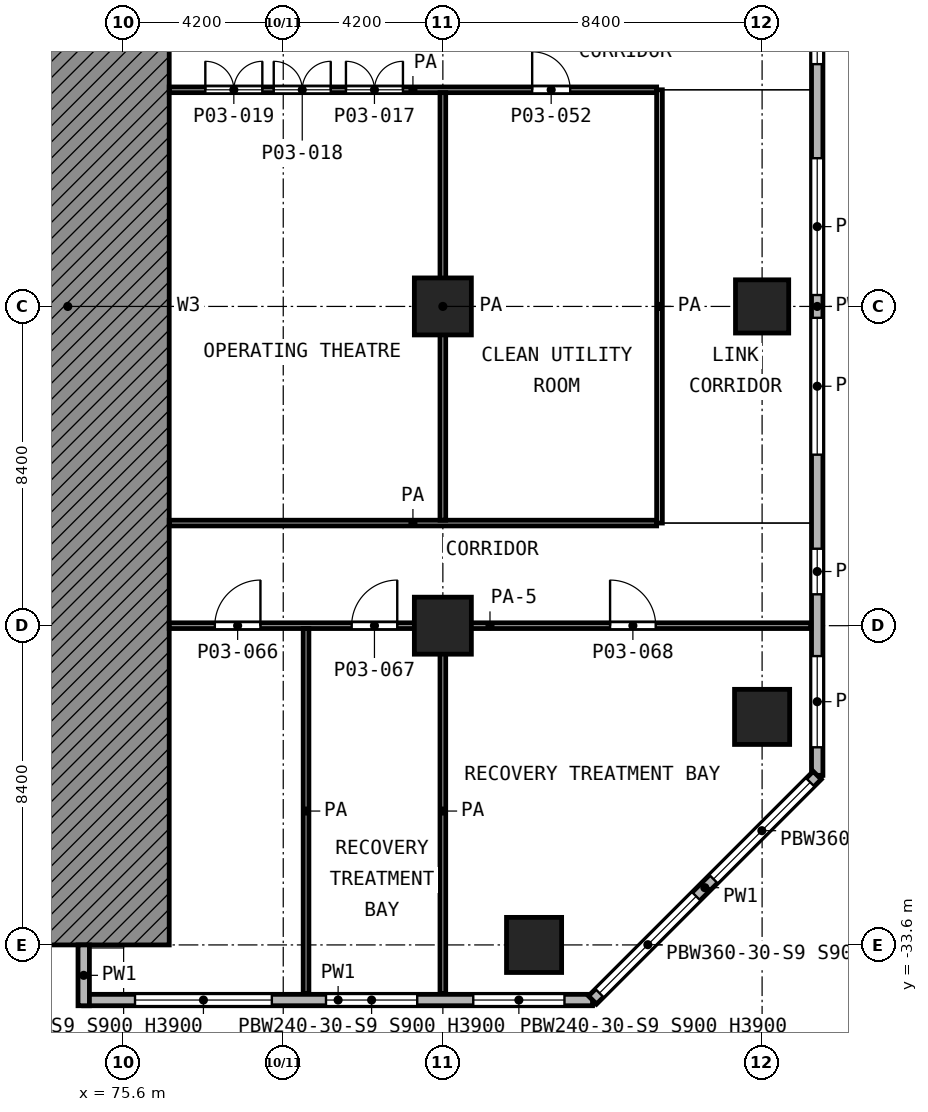
"""IFC4 building model, lengths in metres.
Left out: names, types, materials, properties, quantities, classifications, styles, units other than length and angle.
Written with IfcOpenShell. Run it as: python <this file> out.ifc"""

import sys

from ifc_helpers import new_model, si_unit, direction, frame, frame_2d, origin, origin_2d, place, context, subcontext, project, spatial, polyline, rectangle, outline, extrude, element, fill, save


model = new_model("IFC4")
c1 = context("Model", 3, precision=1e-05, world=origin(), true_north=direction((0.0, 1.0)))
c2 = subcontext(c1, "Body", "Model", "MODEL_VIEW")
j1 = project(units=[si_unit("LENGTHUNIT", "METRE"), si_unit("PLANEANGLEUNIT", "RADIAN")], contexts=[c1])
p1 = place(None, origin())
s1 = spatial("IfcSite", under=j1, at=p1, CompositionType="ELEMENT")
p2 = place(p1, origin())
s2 = spatial("IfcBuilding", under=s1, at=p2, CompositionType="ELEMENT")
p3 = place(p2, frame((0.0, 0.0, 12.6)))
s3 = spatial("IfcBuildingStorey", under=s2, at=p3, CompositionType="ELEMENT", Elevation=12.6)
p4 = place(p3, frame((84.0, -16.8, 0.0), z_axis=(0.0, 0.0, 1.0), x_axis=(1.0, 0.0, 0.0)))
e1 = element("IfcColumn", 1, at=p4, inside=s3, PredefinedType="COLUMN", context=c2, shape_type="SweptSolid", body=[
    extrude(rectangle(XDim=1.5, YDim=1.5, at=origin_2d()), origin(), (0.0, 0.0, 1.0), 5.6),
])
p5 = place(p3, frame((92.4, -16.8, 0.0), z_axis=(0.0, 0.0, 1.0), x_axis=(1.0, 0.0, 0.0)))
e2 = element("IfcColumn", 2, at=p5, inside=s3, PredefinedType="COLUMN", context=c2, shape_type="SweptSolid", body=[
    extrude(rectangle(XDim=1.4, YDim=1.4, at=origin_2d()), origin(), (0.0, 0.0, 1.0), 5.6),
])
p6 = place(p3, frame((84.0, -25.2, 0.0), z_axis=(0.0, 0.0, 1.0), x_axis=(1.0, 0.0, 0.0)))
e3 = element("IfcColumn", 3, at=p6, inside=s3, PredefinedType="COLUMN", context=c2, shape_type="SweptSolid", body=[
    extrude(rectangle(XDim=1.5, YDim=1.5, at=origin_2d()), origin(), (0.0, 0.0, 1.0), 5.6),
])
for number, where, z_axis, x_axis in (
    (4, (92.4, -27.6, 0.0), (0.0, 0.0, 1.0), (1.0, 0.0, 0.0)),
    (5, (86.4, -33.6, 0.0), (0.0, 0.0, 1.0), (1.0, 0.0, 0.0)),
):
    element("IfcColumn", number, at=place(p3, frame(where, z_axis=z_axis, x_axis=x_axis)), inside=s3, PredefinedType="COLUMN", context=c2, shape_type="SweptSolid", body=[
        extrude(rectangle(XDim=1.45, YDim=1.45, at=origin_2d()), origin(), (0.0, 0.0, 1.0), 5.6),
    ])
p7 = place(p3, frame((0.0, 0.0, -12.6), z_axis=(0.0, -1.0, 0.0), x_axis=(1.0, 0.0, 0.0)))
e6 = element("IfcWall", 6, at=p7, inside=s3, PredefinedType="SHEAR", context=c2, shape_type="SweptSolid", body=[
    extrude(outline(polyline([(73.952, 12.6), (73.766, 13.468), (72.986, 15.591), (71.916, 17.583), (71.462, 18.2), (76.8, 18.2), (76.8, 12.6), (73.952, 12.6)])), origin(), (0.0, 0.0, 1.0), 33.6),
])
p8 = place(p3, frame((93.85, -29.138, 0.0), z_axis=(0.0, 0.0, 1.0), x_axis=(0.0, 1.0, 0.0)))
e7 = element("IfcWall", 7, at=p8, inside=s3, PredefinedType="SOLIDWALL", context=c2, shape_type="SweptSolid", body=[
    extrude(rectangle(XDim=24.676, YDim=0.3, at=frame_2d((12.338, 0.0))), origin(), (0.0, 0.0, 1.0), 5.25),
])
p9 = place(p8, frame((0.738, 0.0, 0.9)))
e8 = element("IfcOpeningElement", 8, at=p9, cuts=e7, PredefinedType="OPENING", context=c2, shape_type="SweptSolid", body=[
    extrude(rectangle(XDim=2.4, YDim=3.0, at=frame_2d((1.2, 1.5))), frame((0.0, 0.16, 0.0), z_axis=(0.0, -1.0, 0.0), x_axis=(1.0, 0.0, 0.0)), (0.0, 0.0, 1.0), 0.32),
])
p10 = place(p8, frame((4.763, 0.0, 0.9)))
e9 = element("IfcOpeningElement", 9, at=p10, cuts=e7, PredefinedType="OPENING", context=c2, shape_type="SweptSolid", body=[
    extrude(rectangle(XDim=1.2, YDim=3.0, at=frame_2d((0.6, 1.5))), frame((0.0, 0.16, 0.0), z_axis=(0.0, -1.0, 0.0), x_axis=(1.0, 0.0, 0.0)), (0.0, 0.0, 1.0), 0.32),
])
p11 = place(p8, frame((8.438, 0.0, 0.9)))
e10 = element("IfcOpeningElement", 10, at=p11, cuts=e7, PredefinedType="OPENING", context=c2, shape_type="SweptSolid", body=[
    extrude(rectangle(XDim=3.6, YDim=3.0, at=frame_2d((1.8, 1.5))), frame((0.0, 0.16, 0.0), z_axis=(0.0, -1.0, 0.0), x_axis=(1.0, 0.0, 0.0)), (0.0, 0.0, 1.0), 0.32),
])
p12 = place(p8, frame((12.638, 0.0, 0.9)))
e11 = element("IfcOpeningElement", 11, at=p12, cuts=e7, PredefinedType="OPENING", context=c2, shape_type="SweptSolid", body=[
    extrude(rectangle(XDim=3.6, YDim=3.0, at=frame_2d((1.8, 1.5))), frame((0.0, 0.16, 0.0), z_axis=(0.0, -1.0, 0.0), x_axis=(1.0, 0.0, 0.0)), (0.0, 0.0, 1.0), 0.32),
])
p13 = place(p8, frame((18.713, 0.0, 0.9)))
e12 = element("IfcOpeningElement", 12, at=p13, cuts=e7, PredefinedType="OPENING", context=c2, shape_type="SweptSolid", body=[
    extrude(rectangle(XDim=1.2, YDim=3.0, at=frame_2d((0.6, 1.5))), frame((0.0, 0.16, 0.0), z_axis=(0.0, -1.0, 0.0), x_axis=(1.0, 0.0, 0.0)), (0.0, 0.0, 1.0), 0.32),
])
p14 = place(p8, frame((21.538, 0.0, 0.9)))
e13 = element("IfcOpeningElement", 13, at=p14, cuts=e7, PredefinedType="OPENING", context=c2, shape_type="SweptSolid", body=[
    extrude(rectangle(XDim=2.4, YDim=3.0, at=frame_2d((1.2, 1.5))), frame((0.0, 0.16, 0.0), z_axis=(0.0, -1.0, 0.0), x_axis=(1.0, 0.0, 0.0)), (0.0, 0.0, 1.0), 0.32),
])
p15 = place(p3, frame((74.55, -33.6, 0.0), z_axis=(0.0, 0.0, 1.0), x_axis=(0.0, -1.0, 0.0)))
e14 = element("IfcWall", 14, at=p15, inside=s3, PredefinedType="SOLIDWALL", context=c2, shape_type="SweptSolid", body=[
    extrude(rectangle(XDim=1.6, YDim=0.3, at=frame_2d((0.8, 0.0))), origin(), (0.0, 0.0, 1.0), 5.25),
])
p16 = place(p3, frame((74.55, -35.05, 0.0), z_axis=(0.0, 0.0, 1.0), x_axis=(1.0, 0.0, 0.0)))
e15 = element("IfcWall", 15, at=p16, inside=s3, PredefinedType="SOLIDWALL", context=c2, shape_type="SweptSolid", body=[
    extrude(rectangle(XDim=13.388, YDim=0.3, at=frame_2d((6.694, 0.0))), origin(), (0.0, 0.0, 1.0), 5.25),
])
p17 = place(p16, frame((1.35, 0.0, 0.9)))
e16 = element("IfcOpeningElement", 16, at=p17, cuts=e15, PredefinedType="OPENING", context=c2, shape_type="SweptSolid", body=[
    extrude(rectangle(XDim=3.6, YDim=3.0, at=frame_2d((1.8, 1.5))), frame((0.0, 0.16, 0.0), z_axis=(0.0, -1.0, 0.0), x_axis=(1.0, 0.0, 0.0)), (0.0, 0.0, 1.0), 0.32),
])
p18 = place(p16, frame((6.375, 0.0, 0.9)))
e17 = element("IfcOpeningElement", 17, at=p18, cuts=e15, PredefinedType="OPENING", context=c2, shape_type="SweptSolid", body=[
    extrude(rectangle(XDim=2.4, YDim=3.0, at=frame_2d((1.2, 1.5))), frame((0.0, 0.16, 0.0), z_axis=(0.0, -1.0, 0.0), x_axis=(1.0, 0.0, 0.0)), (0.0, 0.0, 1.0), 0.32),
])
p19 = place(p16, frame((10.25, 0.0, 0.9)))
e18 = element("IfcOpeningElement", 18, at=p19, cuts=e15, PredefinedType="OPENING", context=c2, shape_type="SweptSolid", body=[
    extrude(rectangle(XDim=2.4, YDim=3.0, at=frame_2d((1.2, 1.5))), frame((0.0, 0.16, 0.0), z_axis=(0.0, -1.0, 0.0), x_axis=(1.0, 0.0, 0.0)), (0.0, 0.0, 1.0), 0.32),
])
p20 = place(p3, frame((87.938, -35.05, 0.0), z_axis=(0.0, 0.0, 1.0), x_axis=(0.707106781187, 0.707106781187, 0.0)))
e19 = element("IfcWall", 19, at=p20, inside=s3, PredefinedType="SOLIDWALL", context=c2, shape_type="SweptSolid", body=[
    extrude(rectangle(XDim=8.361, YDim=0.3, at=frame_2d((4.181, 0.0))), origin(), (0.0, 0.0, 1.0), 5.25),
])
p21 = place(p20, frame((0.259, 0.0, 0.9)))
e20 = element("IfcOpeningElement", 20, at=p21, cuts=e19, PredefinedType="OPENING", context=c2, shape_type="SweptSolid", body=[
    extrude(rectangle(XDim=3.6, YDim=3.0, at=frame_2d((1.8, 1.5))), frame((0.0, 0.16, 0.0), z_axis=(0.0, -1.0, 0.0), x_axis=(1.0, 0.0, 0.0)), (0.0, 0.0, 1.0), 0.32),
])
p22 = place(p20, frame((4.502, 0.0, 0.9)))
e21 = element("IfcOpeningElement", 21, at=p22, cuts=e19, PredefinedType="OPENING", context=c2, shape_type="SweptSolid", body=[
    extrude(rectangle(XDim=3.6, YDim=3.0, at=frame_2d((1.8, 1.5))), frame((0.0, 0.16, 0.0), z_axis=(0.0, -1.0, 0.0), x_axis=(1.0, 0.0, 0.0)), (0.0, 0.0, 1.0), 0.32),
])
p23 = place(p3, frame((76.8, -25.2, 0.0), z_axis=(0.0, 0.0, 1.0), x_axis=(1.0, 0.0, 0.0)))
e22 = element("IfcWall", 22, at=p23, inside=s3, PredefinedType="PARTITIONING", context=c2, shape_type="SweptSolid", body=[
    extrude(rectangle(XDim=16.88, YDim=0.15, at=frame_2d((8.44, 0.0))), origin(), (0.0, 0.0, 1.0), 3.85),
])
p24 = place(p23, frame((1.2, 0.0, 0.0)))
e23 = element("IfcOpeningElement", 23, at=p24, cuts=e22, PredefinedType="OPENING", context=c2, shape_type="SweptSolid", body=[
    extrude(rectangle(XDim=1.2, YDim=2.1, at=frame_2d((0.6, 1.05))), frame((0.0, 0.085, 0.0), z_axis=(0.0, -1.0, 0.0), x_axis=(1.0, 0.0, 0.0)), (0.0, 0.0, 1.0), 0.17),
])
p25 = place(p23, frame((4.8, 0.0, 0.0)))
e24 = element("IfcOpeningElement", 24, at=p25, cuts=e22, PredefinedType="OPENING", context=c2, shape_type="SweptSolid", body=[
    extrude(rectangle(XDim=1.2, YDim=2.1, at=frame_2d((0.6, 1.05))), frame((0.0, 0.085, 0.0), z_axis=(0.0, -1.0, 0.0), x_axis=(1.0, 0.0, 0.0)), (0.0, 0.0, 1.0), 0.17),
])
p26 = place(p23, frame((11.6, 0.0, 0.0)))
e25 = element("IfcOpeningElement", 25, at=p26, cuts=e22, PredefinedType="OPENING", context=c2, shape_type="SweptSolid", body=[
    extrude(rectangle(XDim=1.2, YDim=2.1, at=frame_2d((0.6, 1.05))), frame((0.0, 0.085, 0.0), z_axis=(0.0, -1.0, 0.0), x_axis=(1.0, 0.0, 0.0)), (0.0, 0.0, 1.0), 0.17),
])
p27 = place(p3, frame((76.8, -22.5, 0.0), z_axis=(0.0, 0.0, 1.0), x_axis=(1.0, 0.0, 0.0)))
e26 = element("IfcWall", 26, at=p27, inside=s3, PredefinedType="PARTITIONING", context=c2, shape_type="SweptSolid", body=[
    extrude(rectangle(XDim=12.825, YDim=0.15, at=frame_2d((6.413, 0.0))), origin(), (0.0, 0.0, 1.0), 5.25),
])
p28 = place(p3, frame((76.8, -11.1, 0.0), z_axis=(0.0, 0.0, 1.0), x_axis=(1.0, 0.0, 0.0)))
e27 = element("IfcWall", 27, at=p28, inside=s3, PredefinedType="PARTITIONING", context=c2, shape_type="SweptSolid", body=[
    extrude(rectangle(XDim=12.825, YDim=0.15, at=frame_2d((6.413, 0.0))), origin(), (0.0, 0.0, 1.0), 5.25),
])
p29 = place(p28, frame((4.65, 0.0, 0.0)))
e28 = element("IfcOpeningElement", 28, at=p29, cuts=e27, PredefinedType="OPENING", context=c2, shape_type="SweptSolid", body=[
    extrude(rectangle(XDim=1.5, YDim=2.1, at=frame_2d((0.75, 1.05))), frame((0.0, 0.085, 0.0), z_axis=(0.0, -1.0, 0.0), x_axis=(1.0, 0.0, 0.0)), (0.0, 0.0, 1.0), 0.17),
])
p30 = place(p28, frame((2.75, 0.0, 0.0)))
e29 = element("IfcOpeningElement", 29, at=p30, cuts=e27, PredefinedType="OPENING", context=c2, shape_type="SweptSolid", body=[
    extrude(rectangle(XDim=1.5, YDim=2.1, at=frame_2d((0.75, 1.05))), frame((0.0, 0.085, 0.0), z_axis=(0.0, -1.0, 0.0), x_axis=(1.0, 0.0, 0.0)), (0.0, 0.0, 1.0), 0.17),
])
p31 = place(p28, frame((0.95, 0.0, 0.0)))
e30 = element("IfcOpeningElement", 30, at=p31, cuts=e27, PredefinedType="OPENING", context=c2, shape_type="SweptSolid", body=[
    extrude(rectangle(XDim=1.5, YDim=2.1, at=frame_2d((0.75, 1.05))), frame((0.0, 0.085, 0.0), z_axis=(0.0, -1.0, 0.0), x_axis=(1.0, 0.0, 0.0)), (0.0, 0.0, 1.0), 0.17),
])
p32 = place(p28, frame((9.55, 0.0, 0.0)))
e31 = element("IfcOpeningElement", 31, at=p32, cuts=e27, PredefinedType="OPENING", context=c2, shape_type="SweptSolid", body=[
    extrude(rectangle(XDim=1.0, YDim=2.1, at=frame_2d((0.5, 1.05))), frame((0.0, 0.085, 0.0), z_axis=(0.0, -1.0, 0.0), x_axis=(1.0, 0.0, 0.0)), (0.0, 0.0, 1.0), 0.17),
])
for number, where, z_axis, x_axis in (
    (32, (80.4, -34.88, 0.0), (0.0, 0.0, 1.0), (0.0, 1.0, 0.0)),
    (33, (84.0, -34.88, 0.0), (0.0, 0.0, 1.0), (0.0, 1.0, 0.0)),
):
    element("IfcWall", number, at=place(p3, frame(where, z_axis=z_axis, x_axis=x_axis)), inside=s3, PredefinedType="PARTITIONING", context=c2, shape_type="SweptSolid", body=[
        extrude(rectangle(XDim=9.605, YDim=0.15, at=frame_2d((4.802, 0.0))), origin(), (0.0, 0.0, 1.0), 5.25),
    ])
p33 = place(p3, frame((84.0, -22.425, 0.0), z_axis=(0.0, 0.0, 1.0), x_axis=(0.0, 1.0, 0.0)))
e34 = element("IfcWall", 34, at=p33, inside=s3, PredefinedType="PARTITIONING", context=c2, shape_type="SweptSolid", body=[
    extrude(rectangle(XDim=11.25, YDim=0.15, at=frame_2d((5.625, 0.0))), origin(), (0.0, 0.0, 1.0), 5.25),
])
p34 = place(p3, frame((89.7, -22.5, 0.0), z_axis=(0.0, 0.0, 1.0), x_axis=(0.0, 1.0, 0.0)))
e35 = element("IfcWall", 35, at=p34, inside=s3, PredefinedType="PARTITIONING", context=c2, shape_type="SweptSolid", body=[
    extrude(rectangle(XDim=11.4, YDim=0.15, at=frame_2d((5.7, 0.0))), origin(), (0.0, 0.0, 1.0), 5.25),
])
p35 = place(p9, origin())
e36 = element("IfcWindow", 36, at=p35, inside=s3, PartitioningType="SINGLE_PANEL", PredefinedType="WINDOW", context=c2, shape_type="SweptSolid", body=[
    extrude(rectangle(XDim=2.4, YDim=3.0, at=frame_2d((1.2, 1.5))), frame((0.0, 0.03, 0.0), z_axis=(0.0, -1.0, 0.0), x_axis=(1.0, 0.0, 0.0)), (0.0, 0.0, 1.0), 0.06),
])
fill(e8, e36)
p36 = place(p10, origin())
e37 = element("IfcWindow", 37, at=p36, inside=s3, PartitioningType="SINGLE_PANEL", PredefinedType="WINDOW", context=c2, shape_type="SweptSolid", body=[
    extrude(rectangle(XDim=1.2, YDim=3.0, at=frame_2d((0.6, 1.5))), frame((0.0, 0.03, 0.0), z_axis=(0.0, -1.0, 0.0), x_axis=(1.0, 0.0, 0.0)), (0.0, 0.0, 1.0), 0.06),
])
fill(e9, e37)
p37 = place(p11, origin())
e38 = element("IfcWindow", 38, at=p37, inside=s3, PartitioningType="SINGLE_PANEL", PredefinedType="WINDOW", context=c2, shape_type="SweptSolid", body=[
    extrude(rectangle(XDim=3.6, YDim=3.0, at=frame_2d((1.8, 1.5))), frame((0.0, 0.03, 0.0), z_axis=(0.0, -1.0, 0.0), x_axis=(1.0, 0.0, 0.0)), (0.0, 0.0, 1.0), 0.06),
])
fill(e10, e38)
p38 = place(p12, origin())
e39 = element("IfcWindow", 39, at=p38, inside=s3, PartitioningType="SINGLE_PANEL", PredefinedType="WINDOW", context=c2, shape_type="SweptSolid", body=[
    extrude(rectangle(XDim=3.6, YDim=3.0, at=frame_2d((1.8, 1.5))), frame((0.0, 0.03, 0.0), z_axis=(0.0, -1.0, 0.0), x_axis=(1.0, 0.0, 0.0)), (0.0, 0.0, 1.0), 0.06),
])
fill(e11, e39)
p39 = place(p13, origin())
e40 = element("IfcWindow", 40, at=p39, inside=s3, PartitioningType="SINGLE_PANEL", PredefinedType="WINDOW", context=c2, shape_type="SweptSolid", body=[
    extrude(rectangle(XDim=1.2, YDim=3.0, at=frame_2d((0.6, 1.5))), frame((0.0, 0.03, 0.0), z_axis=(0.0, -1.0, 0.0), x_axis=(1.0, 0.0, 0.0)), (0.0, 0.0, 1.0), 0.06),
])
fill(e12, e40)
p40 = place(p17, origin())
e41 = element("IfcWindow", 41, at=p40, inside=s3, PartitioningType="SINGLE_PANEL", PredefinedType="WINDOW", context=c2, shape_type="SweptSolid", body=[
    extrude(rectangle(XDim=3.6, YDim=3.0, at=frame_2d((1.8, 1.5))), frame((0.0, 0.03, 0.0), z_axis=(0.0, -1.0, 0.0), x_axis=(1.0, 0.0, 0.0)), (0.0, 0.0, 1.0), 0.06),
])
fill(e16, e41)
p41 = place(p18, origin())
e42 = element("IfcWindow", 42, at=p41, inside=s3, PartitioningType="SINGLE_PANEL", PredefinedType="WINDOW", context=c2, shape_type="SweptSolid", body=[
    extrude(rectangle(XDim=2.4, YDim=3.0, at=frame_2d((1.2, 1.5))), frame((0.0, 0.03, 0.0), z_axis=(0.0, -1.0, 0.0), x_axis=(1.0, 0.0, 0.0)), (0.0, 0.0, 1.0), 0.06),
])
fill(e17, e42)
p42 = place(p19, origin())
e43 = element("IfcWindow", 43, at=p42, inside=s3, PartitioningType="SINGLE_PANEL", PredefinedType="WINDOW", context=c2, shape_type="SweptSolid", body=[
    extrude(rectangle(XDim=2.4, YDim=3.0, at=frame_2d((1.2, 1.5))), frame((0.0, 0.03, 0.0), z_axis=(0.0, -1.0, 0.0), x_axis=(1.0, 0.0, 0.0)), (0.0, 0.0, 1.0), 0.06),
])
fill(e18, e43)
p43 = place(p21, origin())
e44 = element("IfcWindow", 44, at=p43, inside=s3, PartitioningType="SINGLE_PANEL", PredefinedType="WINDOW", context=c2, shape_type="SweptSolid", body=[
    extrude(rectangle(XDim=3.6, YDim=3.0, at=frame_2d((1.8, 1.5))), frame((0.0, 0.03, 0.0), z_axis=(0.0, -1.0, 0.0), x_axis=(1.0, 0.0, 0.0)), (0.0, 0.0, 1.0), 0.06),
])
fill(e20, e44)
p44 = place(p22, origin())
e45 = element("IfcWindow", 45, at=p44, inside=s3, PartitioningType="SINGLE_PANEL", PredefinedType="WINDOW", context=c2, shape_type="SweptSolid", body=[
    extrude(rectangle(XDim=3.6, YDim=3.0, at=frame_2d((1.8, 1.5))), frame((0.0, 0.03, 0.0), z_axis=(0.0, -1.0, 0.0), x_axis=(1.0, 0.0, 0.0)), (0.0, 0.0, 1.0), 0.06),
])
fill(e21, e45)
p45 = place(p29, origin())
e46 = element("IfcDoor", 46, at=p45, inside=s3, OperationType="DOUBLE_DOOR_SINGLE_SWING", PredefinedType="DOOR", context=c2, shape_type="SweptSolid", body=[
    extrude(rectangle(XDim=1.5, YDim=2.1, at=frame_2d((0.75, 1.05))), frame((0.0, 0.025, 0.0), z_axis=(0.0, -1.0, 0.0), x_axis=(1.0, 0.0, 0.0)), (0.0, 0.0, 1.0), 0.05),
])
fill(e28, e46)
p46 = place(p30, origin())
e47 = element("IfcDoor", 47, at=p46, inside=s3, OperationType="DOUBLE_DOOR_SINGLE_SWING", PredefinedType="DOOR", context=c2, shape_type="SweptSolid", body=[
    extrude(rectangle(XDim=1.5, YDim=2.1, at=frame_2d((0.75, 1.05))), frame((0.0, 0.025, 0.0), z_axis=(0.0, -1.0, 0.0), x_axis=(1.0, 0.0, 0.0)), (0.0, 0.0, 1.0), 0.05),
])
fill(e29, e47)
p47 = place(p31, origin())
e48 = element("IfcDoor", 48, at=p47, inside=s3, OperationType="DOUBLE_DOOR_SINGLE_SWING", PredefinedType="DOOR", context=c2, shape_type="SweptSolid", body=[
    extrude(rectangle(XDim=1.5, YDim=2.1, at=frame_2d((0.75, 1.05))), frame((0.0, 0.025, 0.0), z_axis=(0.0, -1.0, 0.0), x_axis=(1.0, 0.0, 0.0)), (0.0, 0.0, 1.0), 0.05),
])
fill(e30, e48)
p48 = place(p32, origin())
e49 = element("IfcDoor", 49, at=p48, inside=s3, OperationType="SINGLE_SWING_LEFT", PredefinedType="DOOR", context=c2, shape_type="SweptSolid", body=[
    extrude(rectangle(XDim=1.0, YDim=2.1, at=frame_2d((0.5, 1.05))), frame((0.0, 0.025, 0.0), z_axis=(0.0, -1.0, 0.0), x_axis=(1.0, 0.0, 0.0)), (0.0, 0.0, 1.0), 0.05),
])
fill(e31, e49)
p49 = place(p24, origin())
e50 = element("IfcDoor", 50, at=p49, inside=s3, OperationType="SINGLE_SWING_RIGHT", PredefinedType="DOOR", context=c2, shape_type="SweptSolid", body=[
    extrude(rectangle(XDim=1.2, YDim=2.1, at=frame_2d((0.6, 1.05))), frame((0.0, 0.025, 0.0), z_axis=(0.0, -1.0, 0.0), x_axis=(1.0, 0.0, 0.0)), (0.0, 0.0, 1.0), 0.05),
])
fill(e23, e50)
p50 = place(p25, origin())
e51 = element("IfcDoor", 51, at=p50, inside=s3, OperationType="SINGLE_SWING_RIGHT", PredefinedType="DOOR", context=c2, shape_type="SweptSolid", body=[
    extrude(rectangle(XDim=1.2, YDim=2.1, at=frame_2d((0.6, 1.05))), frame((0.0, 0.025, 0.0), z_axis=(0.0, -1.0, 0.0), x_axis=(1.0, 0.0, 0.0)), (0.0, 0.0, 1.0), 0.05),
])
fill(e24, e51)
p51 = place(p26, origin())
e52 = element("IfcDoor", 52, at=p51, inside=s3, OperationType="SINGLE_SWING_LEFT", PredefinedType="DOOR", context=c2, shape_type="SweptSolid", body=[
    extrude(rectangle(XDim=1.2, YDim=2.1, at=frame_2d((0.6, 1.05))), frame((0.0, 0.025, 0.0), z_axis=(0.0, -1.0, 0.0), x_axis=(1.0, 0.0, 0.0)), (0.0, 0.0, 1.0), 0.05),
])
fill(e25, e52)
save(model, sys.argv[1])
